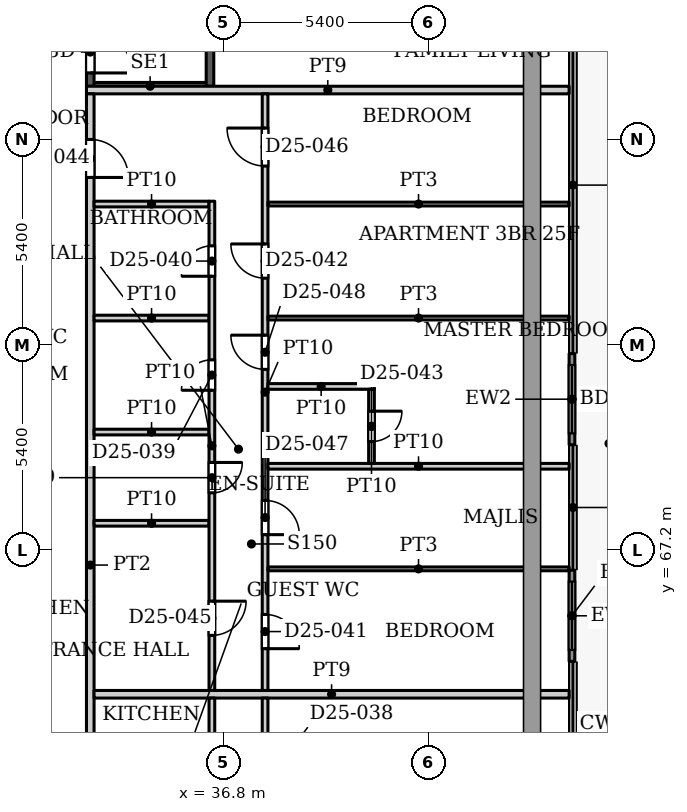
"""IFC4 building model, lengths in metres.
Left out: names, types, materials, properties, quantities, classifications, styles, units other than length and angle.
Written with IfcOpenShell. Run it as: python <this file> out.ifc"""

import sys

from ifc_helpers import new_model, si_unit, direction, frame, frame_2d, origin, place, context, subcontext, project, spatial, rectangle, extrude, source, transform, mapped, element, fill, save


model = new_model("IFC4")
c1 = context("Model", 3, precision=1e-05, world=origin(), true_north=direction((0.0, 1.0)))
c2 = subcontext(c1, "Body", "Model", "MODEL_VIEW")
j1 = project(units=[si_unit("LENGTHUNIT", "METRE"), si_unit("PLANEANGLEUNIT", "RADIAN")], contexts=[c1])
p1 = place(None, origin())
s1 = spatial("IfcSite", under=j1, at=p1, CompositionType="ELEMENT")
p2 = place(p1, origin())
s2 = spatial("IfcBuilding", under=s1, at=p2, CompositionType="ELEMENT")
p3 = place(p2, frame((0.0, 0.0, 109.7)))
s3 = spatial("IfcBuildingStorey", under=s2, at=p3, CompositionType="ELEMENT", Elevation=109.7)
p4 = place(p3, frame((45.975, 72.365, 0.0), z_axis=(0.0, 0.0, 1.0), x_axis=(0.0, -1.0, 0.0)))
e1 = element("IfcWall", 1, at=p4, inside=s3, PredefinedType="SOLIDWALL", context=c2, shape_type="SweptSolid", body=[
    extrude(rectangle(XDim=2.4, YDim=0.15, at=frame_2d((1.2, 0.0))), origin(), (0.0, 0.0, 1.0), 3.75),
])
p5 = place(p4, frame((0.3, 0.0, 0.0)))
e2 = element("IfcOpeningElement", 2, at=p5, cuts=e1, PredefinedType="OPENING", context=c2, shape_type="SweptSolid", body=[
    extrude(rectangle(XDim=1.8, YDim=2.4, at=frame_2d((0.9, 1.2))), frame((0.0, 0.085, 0.0), z_axis=(0.0, -1.0, 0.0), x_axis=(1.0, 0.0, 0.0)), (0.0, 0.0, 1.0), 0.17),
])
p6 = place(p3, frame((45.975, 66.665, 0.0), z_axis=(0.0, 0.0, 1.0), x_axis=(0.0, -1.0, 0.0)))
e3 = element("IfcWall", 3, at=p6, inside=s3, PredefinedType="SOLIDWALL", context=c2, shape_type="SweptSolid", body=[
    extrude(rectangle(XDim=2.4, YDim=0.15, at=frame_2d((1.2, 0.0))), origin(), (0.0, 0.0, 1.0), 3.75),
])
p7 = place(p6, frame((0.3, 0.0, 0.0)))
e4 = element("IfcOpeningElement", 4, at=p7, cuts=e3, PredefinedType="OPENING", context=c2, shape_type="SweptSolid", body=[
    extrude(rectangle(XDim=1.8, YDim=2.4, at=frame_2d((0.9, 1.2))), frame((0.0, 0.085, 0.0), z_axis=(0.0, -1.0, 0.0), x_axis=(1.0, 0.0, 0.0)), (0.0, 0.0, 1.0), 0.17),
])
p8 = place(p3, frame((33.3, 79.4, 0.0), z_axis=(0.0, 0.0, 1.0), x_axis=(1.0, 0.0, 0.0)))
e5 = element("IfcWall", 5, at=p8, inside=s3, PredefinedType="SHEAR", context=c2, shape_type="SweptSolid", body=[
    extrude(rectangle(XDim=3.15, YDim=0.2, at=frame_2d((1.575, 0.0))), origin(), (0.0, 0.0, 1.0), 3.9),
])
p9 = place(p3, frame((33.3, 79.4, 0.0), z_axis=(0.0, 0.0, 1.0), x_axis=(0.0, 1.0, 0.0)))
e6 = element("IfcWall", 6, at=p9, inside=s3, PredefinedType="SHEAR", context=c2, shape_type="SweptSolid", body=[
    extrude(rectangle(XDim=9.16, YDim=0.2, at=frame_2d((4.58, 0.0))), origin(), (0.0, 0.0, 1.0), 3.9),
])
p10 = place(p9, frame((0.35, 0.0, 0.0)))
e7 = element("IfcOpeningElement", 7, at=p10, cuts=e6, PredefinedType="OPENING", context=c2, shape_type="SweptSolid", body=[
    extrude(rectangle(XDim=1.1, YDim=2.2, at=frame_2d((0.55, 1.1))), frame((0.0, 0.11, 0.0), z_axis=(0.0, -1.0, 0.0), x_axis=(1.0, 0.0, 0.0)), (0.0, 0.0, 1.0), 0.22),
])
p11 = place(p3, frame((36.45, 79.4, 0.0), z_axis=(0.0, 0.0, 1.0), x_axis=(0.0, 1.0, 0.0)))
e8 = element("IfcWall", 8, at=p11, inside=s3, PredefinedType="SHEAR", context=c2, shape_type="SweptSolid", body=[
    extrude(rectangle(XDim=9.16, YDim=0.2, at=frame_2d((4.58, 0.0))), origin(), (0.0, 0.0, 1.0), 3.9),
])
p12 = place(p3, frame((33.2, 79.3, 0.0), z_axis=(0.0, 0.0, 1.0), x_axis=(1.0, 0.0, 0.0)))
e9 = element("IfcWall", 9, at=p12, inside=s3, PredefinedType="PARTITIONING", context=c2, shape_type="SweptSolid", body=[
    extrude(rectangle(XDim=12.7, YDim=0.2, at=frame_2d((6.35, 0.0))), origin(), (0.0, 0.0, 1.0), 3.6),
])
p13 = place(p3, frame((33.3, 54.4, 0.0), z_axis=(0.0, 0.0, 1.0), x_axis=(0.0, 1.0, 0.0)))
e10 = element("IfcWall", 10, at=p13, inside=s3, PredefinedType="PARTITIONING", context=c2, shape_type="SweptSolid", body=[
    extrude(rectangle(XDim=24.8, YDim=0.2, at=frame_2d((12.4, 0.0))), origin(), (0.0, 0.0, 1.0), 3.6),
])
p14 = place(p13, frame((2.5, 0.0, 0.0)))
e11 = element("IfcOpeningElement", 11, at=p14, cuts=e10, PredefinedType="OPENING", context=c2, shape_type="SweptSolid", body=[
    extrude(rectangle(XDim=1.0, YDim=2.1, at=frame_2d((0.5, 1.05))), frame((0.0, 0.11, 0.0), z_axis=(0.0, -1.0, 0.0), x_axis=(1.0, 0.0, 0.0)), (0.0, 0.0, 1.0), 0.22),
])
p15 = place(p13, frame((22.6, 0.0, 0.0)))
e12 = element("IfcOpeningElement", 12, at=p15, cuts=e10, PredefinedType="OPENING", context=c2, shape_type="SweptSolid", body=[
    extrude(rectangle(XDim=1.0, YDim=2.1, at=frame_2d((0.5, 1.05))), frame((0.0, 0.11, 0.0), z_axis=(0.0, -1.0, 0.0), x_axis=(1.0, 0.0, 0.0)), (0.0, 0.0, 1.0), 0.22),
])
p16 = place(p3, frame((33.4, 63.4, 0.0), z_axis=(0.0, 0.0, 1.0), x_axis=(1.0, 0.0, 0.0)))
e13 = element("IfcWall", 13, at=p16, inside=s3, PredefinedType="PARTITIONING", context=c2, shape_type="SweptSolid", body=[
    extrude(rectangle(XDim=12.5, YDim=0.2, at=frame_2d((6.25, 0.0))), origin(), (0.0, 0.0, 1.0), 3.6),
])
for number, where, z_axis, x_axis in (
    (14, (33.4, 67.9, 0.0), (0.0, 0.0, 1.0), (1.0, 0.0, 0.0)),
    (15, (33.4, 70.3, 0.0), (0.0, 0.0, 1.0), (1.0, 0.0, 0.0)),
    (16, (33.4, 73.3, 0.0), (0.0, 0.0, 1.0), (1.0, 0.0, 0.0)),
    (17, (33.4, 76.3, 0.0), (0.0, 0.0, 1.0), (1.0, 0.0, 0.0)),
):
    element("IfcWall", number, at=place(p3, frame(where, z_axis=z_axis, x_axis=x_axis)), inside=s3, PredefinedType="PARTITIONING", context=c2, shape_type="SweptSolid", body=[
        extrude(rectangle(XDim=3.025, YDim=0.15, at=frame_2d((1.513, 0.0))), origin(), (0.0, 0.0, 1.0), 3.6),
    ])
p17 = place(p3, frame((36.5, 58.225, 0.0), z_axis=(0.0, 0.0, 1.0), x_axis=(0.0, 1.0, 0.0)))
e18 = element("IfcWall", 18, at=p17, inside=s3, PredefinedType="PARTITIONING", context=c2, shape_type="SweptSolid", body=[
    extrude(rectangle(XDim=5.075, YDim=0.15, at=frame_2d((2.538, 0.0))), origin(), (0.0, 0.0, 1.0), 3.6),
])
p18 = place(p17, frame((3.075, 0.0, 0.0)))
e19 = element("IfcOpeningElement", 19, at=p18, cuts=e18, PredefinedType="OPENING", context=c2, shape_type="SweptSolid", body=[
    extrude(rectangle(XDim=0.9, YDim=2.1, at=frame_2d((0.45, 1.05))), frame((0.0, 0.085, 0.0), z_axis=(0.0, -1.0, 0.0), x_axis=(1.0, 0.0, 0.0)), (0.0, 0.0, 1.0), 0.17),
])
p19 = place(p17, frame((0.575, 0.0, 0.0)))
e20 = element("IfcOpeningElement", 20, at=p19, cuts=e18, PredefinedType="OPENING", context=c2, shape_type="SweptSolid", body=[
    extrude(rectangle(XDim=0.8, YDim=2.1, at=frame_2d((0.4, 1.05))), frame((0.0, 0.085, 0.0), z_axis=(0.0, -1.0, 0.0), x_axis=(1.0, 0.0, 0.0)), (0.0, 0.0, 1.0), 0.17),
])
p20 = place(p3, frame((36.5, 63.5, 0.0), z_axis=(0.0, 0.0, 1.0), x_axis=(0.0, 1.0, 0.0)))
e21 = element("IfcWall", 21, at=p20, inside=s3, PredefinedType="PARTITIONING", context=c2, shape_type="SweptSolid", body=[
    extrude(rectangle(XDim=12.875, YDim=0.15, at=frame_2d((6.438, 0.0))), origin(), (0.0, 0.0, 1.0), 3.6),
])
p21 = place(p20, frame((7.9, 0.0, 0.0)))
e22 = element("IfcOpeningElement", 22, at=p21, cuts=e21, PredefinedType="OPENING", context=c2, shape_type="SweptSolid", body=[
    extrude(rectangle(XDim=0.8, YDim=2.1, at=frame_2d((0.4, 1.05))), frame((0.0, 0.085, 0.0), z_axis=(0.0, -1.0, 0.0), x_axis=(1.0, 0.0, 0.0)), (0.0, 0.0, 1.0), 0.17),
])
p22 = place(p20, frame((10.9, 0.0, 0.0)))
e23 = element("IfcOpeningElement", 23, at=p22, cuts=e21, PredefinedType="OPENING", context=c2, shape_type="SweptSolid", body=[
    extrude(rectangle(XDim=0.8, YDim=2.1, at=frame_2d((0.4, 1.05))), frame((0.0, 0.085, 0.0), z_axis=(0.0, -1.0, 0.0), x_axis=(1.0, 0.0, 0.0)), (0.0, 0.0, 1.0), 0.17),
])
p23 = place(p20, frame((1.45, 0.0, 0.0)))
e24 = element("IfcOpeningElement", 24, at=p23, cuts=e21, PredefinedType="OPENING", context=c2, shape_type="SweptSolid", body=[
    extrude(rectangle(XDim=0.9, YDim=2.1, at=frame_2d((0.45, 1.05))), frame((0.0, 0.085, 0.0), z_axis=(0.0, -1.0, 0.0), x_axis=(1.0, 0.0, 0.0)), (0.0, 0.0, 1.0), 0.17),
])
p24 = place(p20, frame((5.2, 0.0, 0.0)))
e25 = element("IfcOpeningElement", 25, at=p24, cuts=e21, PredefinedType="OPENING", context=c2, shape_type="SweptSolid", body=[
    extrude(rectangle(XDim=0.8, YDim=2.1, at=frame_2d((0.4, 1.05))), frame((0.0, 0.085, 0.0), z_axis=(0.0, -1.0, 0.0), x_axis=(1.0, 0.0, 0.0)), (0.0, 0.0, 1.0), 0.17),
])
p25 = place(p3, frame((37.9, 54.2, 0.0), z_axis=(0.0, 0.0, 1.0), x_axis=(0.0, 1.0, 0.0)))
e26 = element("IfcWall", 26, at=p25, inside=s3, PredefinedType="PARTITIONING", context=c2, shape_type="SweptSolid", body=[
    extrude(rectangle(XDim=9.1, YDim=0.15, at=frame_2d((4.55, 0.0))), origin(), (0.0, 0.0, 1.0), 3.6),
])
p26 = place(p25, frame((6.8, 0.0, 0.0)))
e27 = element("IfcOpeningElement", 27, at=p26, cuts=e26, PredefinedType="OPENING", context=c2, shape_type="SweptSolid", body=[
    extrude(rectangle(XDim=0.9, YDim=2.1, at=frame_2d((0.45, 1.05))), frame((0.0, 0.085, 0.0), z_axis=(0.0, -1.0, 0.0), x_axis=(1.0, 0.0, 0.0)), (0.0, 0.0, 1.0), 0.17),
])
p27 = place(p25, frame((2.1, 0.0, 0.0)))
e28 = element("IfcOpeningElement", 28, at=p27, cuts=e26, PredefinedType="OPENING", context=c2, shape_type="SweptSolid", body=[
    extrude(rectangle(XDim=1.0, YDim=2.1, at=frame_2d((0.5, 1.05))), frame((0.0, 0.085, 0.0), z_axis=(0.0, -1.0, 0.0), x_axis=(1.0, 0.0, 0.0)), (0.0, 0.0, 1.0), 0.17),
])
p28 = place(p3, frame((37.9, 63.5, 0.0), z_axis=(0.0, 0.0, 1.0), x_axis=(0.0, 1.0, 0.0)))
e29 = element("IfcWall", 29, at=p28, inside=s3, PredefinedType="PARTITIONING", context=c2, shape_type="SweptSolid", body=[
    extrude(rectangle(XDim=15.7, YDim=0.15, at=frame_2d((7.85, 0.0))), origin(), (0.0, 0.0, 1.0), 3.6),
])
p29 = place(p28, frame((1.1, 0.0, 0.0)))
e30 = element("IfcOpeningElement", 30, at=p29, cuts=e29, PredefinedType="OPENING", context=c2, shape_type="SweptSolid", body=[
    extrude(rectangle(XDim=0.9, YDim=2.1, at=frame_2d((0.45, 1.05))), frame((0.0, 0.085, 0.0), z_axis=(0.0, -1.0, 0.0), x_axis=(1.0, 0.0, 0.0)), (0.0, 0.0, 1.0), 0.17),
])
p30 = place(p28, frame((10.85, 0.0, 0.0)))
e31 = element("IfcOpeningElement", 31, at=p30, cuts=e29, PredefinedType="OPENING", context=c2, shape_type="SweptSolid", body=[
    extrude(rectangle(XDim=0.9, YDim=2.1, at=frame_2d((0.45, 1.05))), frame((0.0, 0.085, 0.0), z_axis=(0.0, -1.0, 0.0), x_axis=(1.0, 0.0, 0.0)), (0.0, 0.0, 1.0), 0.17),
])
p31 = place(p28, frame((13.8, 0.0, 0.0)))
e32 = element("IfcOpeningElement", 32, at=p31, cuts=e29, PredefinedType="OPENING", context=c2, shape_type="SweptSolid", body=[
    extrude(rectangle(XDim=1.0, YDim=2.1, at=frame_2d((0.5, 1.05))), frame((0.0, 0.085, 0.0), z_axis=(0.0, -1.0, 0.0), x_axis=(1.0, 0.0, 0.0)), (0.0, 0.0, 1.0), 0.17),
])
p32 = place(p28, frame((4.1, 0.0, 0.0)))
e33 = element("IfcOpeningElement", 33, at=p32, cuts=e29, PredefinedType="OPENING", context=c2, shape_type="SweptSolid", body=[
    extrude(rectangle(XDim=0.9, YDim=2.1, at=frame_2d((0.45, 1.05))), frame((0.0, 0.085, 0.0), z_axis=(0.0, -1.0, 0.0), x_axis=(1.0, 0.0, 0.0)), (0.0, 0.0, 1.0), 0.17),
])
p33 = place(p28, frame((8.45, 0.0, 0.0)))
e34 = element("IfcOpeningElement", 34, at=p33, cuts=e29, PredefinedType="OPENING", context=c2, shape_type="SweptSolid", body=[
    extrude(rectangle(XDim=0.9, YDim=2.1, at=frame_2d((0.45, 1.05))), frame((0.0, 0.085, 0.0), z_axis=(0.0, -1.0, 0.0), x_axis=(1.0, 0.0, 0.0)), (0.0, 0.0, 1.0), 0.17),
])
p34 = place(p3, frame((37.975, 66.7, 0.0), z_axis=(0.0, 0.0, 1.0), x_axis=(1.0, 0.0, 0.0)))
e35 = element("IfcWall", 35, at=p34, inside=s3, PredefinedType="PARTITIONING", context=c2, shape_type="SweptSolid", body=[
    extrude(rectangle(XDim=7.925, YDim=0.1, at=frame_2d((3.962, 0.0))), origin(), (0.0, 0.0, 1.0), 3.6),
])
p35 = place(p3, frame((37.975, 69.4, 0.0), z_axis=(0.0, 0.0, 1.0), x_axis=(1.0, 0.0, 0.0)))
e36 = element("IfcWall", 36, at=p35, inside=s3, PredefinedType="PARTITIONING", context=c2, shape_type="SweptSolid", body=[
    extrude(rectangle(XDim=7.925, YDim=0.15, at=frame_2d((3.962, 0.0))), origin(), (0.0, 0.0, 1.0), 3.6),
])
p36 = place(p3, frame((37.975, 71.5, 0.0), z_axis=(0.0, 0.0, 1.0), x_axis=(1.0, 0.0, 0.0)))
e37 = element("IfcWall", 37, at=p36, inside=s3, PredefinedType="PARTITIONING", context=c2, shape_type="SweptSolid", body=[
    extrude(rectangle(XDim=2.8, YDim=0.15, at=frame_2d((1.4, 0.0))), origin(), (0.0, 0.0, 1.0), 3.6),
])
for number, where, z_axis, x_axis in (
    (38, (37.975, 73.3, 0.0), (0.0, 0.0, 1.0), (1.0, 0.0, 0.0)),
    (39, (37.975, 76.3, 0.0), (0.0, 0.0, 1.0), (1.0, 0.0, 0.0)),
):
    element("IfcWall", number, at=place(p3, frame(where, z_axis=z_axis, x_axis=x_axis)), inside=s3, PredefinedType="PARTITIONING", context=c2, shape_type="SweptSolid", body=[
        extrude(rectangle(XDim=7.925, YDim=0.1, at=frame_2d((3.962, 0.0))), origin(), (0.0, 0.0, 1.0), 3.6),
    ])
p37 = place(p3, frame((40.7, 69.475, 0.0), z_axis=(0.0, 0.0, 1.0), x_axis=(0.0, 1.0, 0.0)))
e40 = element("IfcWall", 40, at=p37, inside=s3, PredefinedType="PARTITIONING", context=c2, shape_type="SweptSolid", body=[
    extrude(rectangle(XDim=1.95, YDim=0.15, at=frame_2d((0.975, 0.0))), origin(), (0.0, 0.0, 1.0), 3.6),
])
p38 = place(p37, frame((0.575, 0.0, 0.0)))
e41 = element("IfcOpeningElement", 41, at=p38, cuts=e40, PredefinedType="OPENING", context=c2, shape_type="SweptSolid", body=[
    extrude(rectangle(XDim=0.8, YDim=2.1, at=frame_2d((0.4, 1.05))), frame((0.0, 0.085, 0.0), z_axis=(0.0, -1.0, 0.0), x_axis=(1.0, 0.0, 0.0)), (0.0, 0.0, 1.0), 0.17),
])
m1 = source(origin(), c2, "Body", "SweptSolid", [
    extrude(rectangle(XDim=1.8, YDim=2.4, at=frame_2d((0.9, 1.2))), frame((0.0, 0.025, 0.0), z_axis=(0.0, -1.0, 0.0), x_axis=(1.0, 0.0, 0.0)), (0.0, 0.0, 1.0), 0.05),
])
p39 = place(p5, origin())
e42 = element("IfcDoor", 42, at=p39, inside=s3, OperationType="SLIDING_TO_LEFT", PredefinedType="DOOR", context=c2, shape_type="MappedRepresentation", body=[
    mapped(m1, transform((0.0, 0.0, 0.0), x_axis=(1.0, 0.0, 0.0), y_axis=(0.0, 1.0, 0.0), z_axis=(0.0, 0.0, 1.0), scale=1.0)),
])
fill(e2, e42)
p40 = place(p7, origin())
e43 = element("IfcDoor", 43, at=p40, inside=s3, OperationType="SLIDING_TO_LEFT", PredefinedType="DOOR", context=c2, shape_type="MappedRepresentation", body=[
    mapped(m1, transform((0.0, 0.0, 0.0), x_axis=(1.0, 0.0, 0.0), y_axis=(0.0, 1.0, 0.0), z_axis=(0.0, 0.0, 1.0), scale=1.0)),
])
fill(e4, e43)
m2 = source(origin(), c2, "Body", "SweptSolid", [
    extrude(rectangle(XDim=1.1, YDim=2.2, at=frame_2d((0.55, 1.1))), frame((0.0, 0.025, 0.0), z_axis=(0.0, -1.0, 0.0), x_axis=(1.0, 0.0, 0.0)), (0.0, 0.0, 1.0), 0.05),
])
p41 = place(p10, origin())
e44 = element("IfcDoor", 44, at=p41, inside=s3, OperationType="SINGLE_SWING_RIGHT", PredefinedType="DOOR", context=c2, shape_type="MappedRepresentation", body=[
    mapped(m2, transform((0.0, 0.0, 0.0), x_axis=(1.0, 0.0, 0.0), y_axis=(0.0, 1.0, 0.0), z_axis=(0.0, 0.0, 1.0), scale=1.0)),
])
fill(e7, e44)
m3 = source(origin(), c2, "Body", "SweptSolid", [
    extrude(rectangle(XDim=0.8, YDim=2.1, at=frame_2d((0.4, 1.05))), frame((0.0, 0.025, 0.0), z_axis=(0.0, -1.0, 0.0), x_axis=(1.0, 0.0, 0.0)), (0.0, 0.0, 1.0), 0.05),
])
p42 = place(p21, origin())
e45 = element("IfcDoor", 45, at=p42, inside=s3, OperationType="SINGLE_SWING_LEFT", PredefinedType="DOOR", context=c2, shape_type="MappedRepresentation", body=[
    mapped(m3, transform((0.0, 0.0, 0.0), x_axis=(1.0, 0.0, 0.0), y_axis=(0.0, 1.0, 0.0), z_axis=(0.0, 0.0, 1.0), scale=1.0)),
])
fill(e22, e45)
p43 = place(p22, origin())
e46 = element("IfcDoor", 46, at=p43, inside=s3, OperationType="SINGLE_SWING_LEFT", PredefinedType="DOOR", context=c2, shape_type="MappedRepresentation", body=[
    mapped(m3, transform((0.0, 0.0, 0.0), x_axis=(1.0, 0.0, 0.0), y_axis=(0.0, 1.0, 0.0), z_axis=(0.0, 0.0, 1.0), scale=1.0)),
])
fill(e23, e46)
m4 = source(origin(), c2, "Body", "SweptSolid", [
    extrude(rectangle(XDim=0.9, YDim=2.1, at=frame_2d((0.45, 1.05))), frame((0.0, 0.025, 0.0), z_axis=(0.0, -1.0, 0.0), x_axis=(1.0, 0.0, 0.0)), (0.0, 0.0, 1.0), 0.05),
])
p44 = place(p29, origin())
e47 = element("IfcDoor", 47, at=p44, inside=s3, OperationType="SINGLE_SWING_RIGHT", PredefinedType="DOOR", context=c2, shape_type="MappedRepresentation", body=[
    mapped(m4, transform((0.0, 0.0, 0.0), x_axis=(1.0, 0.0, 0.0), y_axis=(0.0, 1.0, 0.0), z_axis=(0.0, 0.0, 1.0), scale=1.0)),
])
fill(e30, e47)
p45 = place(p30, origin())
e48 = element("IfcDoor", 48, at=p45, inside=s3, OperationType="SINGLE_SWING_LEFT", PredefinedType="DOOR", context=c2, shape_type="MappedRepresentation", body=[
    mapped(m4, transform((0.0, 0.0, 0.0), x_axis=(1.0, 0.0, 0.0), y_axis=(0.0, 1.0, 0.0), z_axis=(0.0, 0.0, 1.0), scale=1.0)),
])
fill(e31, e48)
p46 = place(p38, origin())
e49 = element("IfcDoor", 49, at=p46, inside=s3, OperationType="SINGLE_SWING_RIGHT", PredefinedType="DOOR", context=c2, shape_type="MappedRepresentation", body=[
    mapped(m3, transform((0.0, 0.0, 0.0), x_axis=(1.0, 0.0, 0.0), y_axis=(0.0, 1.0, 0.0), z_axis=(0.0, 0.0, 1.0), scale=1.0)),
])
fill(e41, e49)
m5 = source(origin(), c2, "Body", "SweptSolid", [
    extrude(rectangle(XDim=1.0, YDim=2.1, at=frame_2d((0.5, 1.05))), frame((0.0, 0.025, 0.0), z_axis=(0.0, -1.0, 0.0), x_axis=(1.0, 0.0, 0.0)), (0.0, 0.0, 1.0), 0.05),
])
p47 = place(p15, origin())
e50 = element("IfcDoor", 50, at=p47, inside=s3, OperationType="SINGLE_SWING_RIGHT", PredefinedType="DOOR", context=c2, shape_type="MappedRepresentation", body=[
    mapped(m5, transform((0.0, 0.0, 0.0), x_axis=(1.0, 0.0, 0.0), y_axis=(0.0, 1.0, 0.0), z_axis=(0.0, 0.0, 1.0), scale=1.0)),
])
fill(e12, e50)
p48 = place(p23, origin())
e51 = element("IfcDoor", 51, at=p48, inside=s3, OperationType="SINGLE_SWING_RIGHT", PredefinedType="DOOR", context=c2, shape_type="MappedRepresentation", body=[
    mapped(m4, transform((0.0, 0.0, 0.0), x_axis=(1.0, 0.0, 0.0), y_axis=(0.0, 1.0, 0.0), z_axis=(0.0, 0.0, 1.0), scale=1.0)),
])
fill(e24, e51)
m6 = source(origin(), c2, "Body", "SweptSolid", [
    extrude(rectangle(XDim=1.0, YDim=2.1, at=frame_2d((0.5, 1.05))), frame((0.0, 0.025, 0.0), z_axis=(0.0, -1.0, 0.0), x_axis=(1.0, 0.0, 0.0)), (0.0, 0.0, 1.0), 0.05),
])
p49 = place(p31, origin())
e52 = element("IfcDoor", 52, at=p49, inside=s3, OperationType="SINGLE_SWING_LEFT", PredefinedType="DOOR", context=c2, shape_type="MappedRepresentation", body=[
    mapped(m6, transform((0.0, 0.0, 0.0), x_axis=(1.0, 0.0, 0.0), y_axis=(0.0, 1.0, 0.0), z_axis=(0.0, 0.0, 1.0), scale=1.0)),
])
fill(e32, e52)
p50 = place(p32, origin())
e53 = element("IfcDoor", 53, at=p50, inside=s3, OperationType="SINGLE_SWING_RIGHT", PredefinedType="DOOR", context=c2, shape_type="MappedRepresentation", body=[
    mapped(m4, transform((0.0, 0.0, 0.0), x_axis=(1.0, 0.0, 0.0), y_axis=(0.0, 1.0, 0.0), z_axis=(0.0, 0.0, 1.0), scale=1.0)),
])
fill(e33, e53)
p51 = place(p33, origin())
e54 = element("IfcDoor", 54, at=p51, inside=s3, OperationType="SINGLE_SWING_LEFT", PredefinedType="DOOR", context=c2, shape_type="MappedRepresentation", body=[
    mapped(m4, transform((0.0, 0.0, 0.0), x_axis=(1.0, 0.0, 0.0), y_axis=(0.0, 1.0, 0.0), z_axis=(0.0, 0.0, 1.0), scale=1.0)),
])
fill(e34, e54)
p52 = place(p24, origin())
e55 = element("IfcDoor", 55, at=p52, inside=s3, OperationType="SINGLE_SWING_RIGHT", PredefinedType="DOOR", context=c2, shape_type="MappedRepresentation", body=[
    mapped(m3, transform((0.0, 0.0, 0.0), x_axis=(1.0, 0.0, 0.0), y_axis=(0.0, 1.0, 0.0), z_axis=(0.0, 0.0, 1.0), scale=1.0)),
])
fill(e25, e55)
save(model, sys.argv[1])
